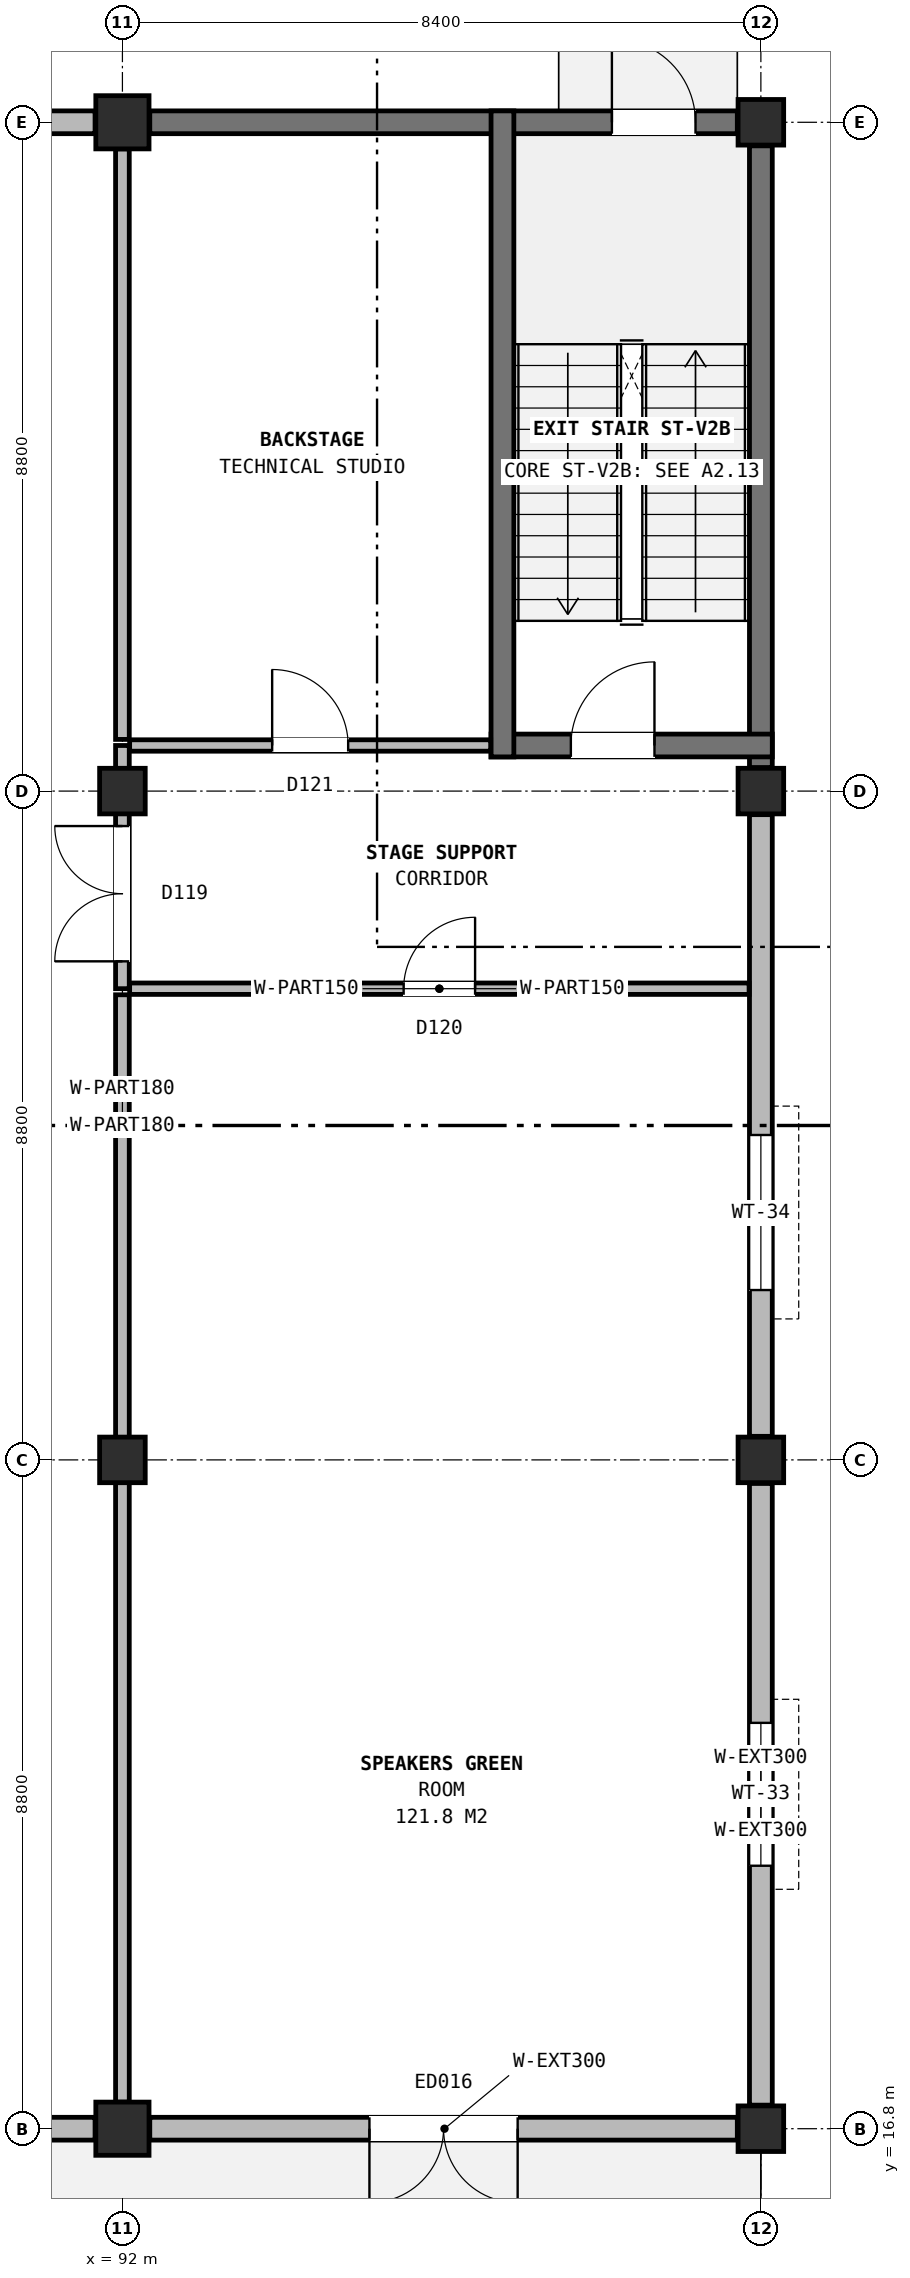
"""IFC4 building model, lengths in metres.
Left out: names, types, materials, properties, quantities, classifications, styles, units other than length and angle.
Written with IfcOpenShell. Run it as: python <this file> out.ifc"""

import sys

from ifc_helpers import new_model, si_unit, direction, frame, frame_2d, origin, origin_2d, place, context, subcontext, project, spatial, rectangle, extrude, element, fill, save


model = new_model("IFC4")
c1 = context("Model", 3, precision=1e-05, world=origin(), true_north=direction((0.0, 1.0)))
c2 = subcontext(c1, "Body", "Model", "MODEL_VIEW")
j1 = project(units=[si_unit("LENGTHUNIT", "METRE"), si_unit("PLANEANGLEUNIT", "RADIAN")], contexts=[c1])
p1 = place(None, origin())
s1 = spatial("IfcSite", under=j1, at=p1, CompositionType="ELEMENT")
p2 = place(p1, origin())
s2 = spatial("IfcBuilding", under=s1, at=p2, CompositionType="ELEMENT")
p3 = place(p2, origin())
s3 = spatial("IfcBuildingStorey", under=s2, at=p3, CompositionType="ELEMENT", Elevation=0.0)
p4 = place(p3, frame((92.0, 16.8, 0.0), z_axis=(0.0, 0.0, 1.0), x_axis=(1.0, 0.0, 0.0)))
e1 = element("IfcColumn", 1, at=p4, inside=s3, PredefinedType="COLUMN", context=c2, shape_type="SweptSolid", body=[
    extrude(rectangle(XDim=0.7, YDim=0.7, at=origin_2d()), origin(), (0.0, 0.0, 1.0), 4.8),
])
for number, where, z_axis, x_axis in (
    (2, (92.0, 25.6, 0.0), (0.0, 0.0, 1.0), (1.0, 0.0, 0.0)),
    (3, (92.0, 34.4, 0.0), (0.0, 0.0, 1.0), (1.0, 0.0, 0.0)),
):
    element("IfcColumn", number, at=place(p3, frame(where, z_axis=z_axis, x_axis=x_axis)), inside=s3, PredefinedType="COLUMN", context=c2, shape_type="SweptSolid", body=[
        extrude(rectangle(XDim=0.6, YDim=0.6, at=origin_2d()), origin(), (0.0, 0.0, 1.0), 4.8),
    ])
p5 = place(p3, frame((92.0, 43.2, 0.0), z_axis=(0.0, 0.0, 1.0), x_axis=(1.0, 0.0, 0.0)))
e4 = element("IfcColumn", 4, at=p5, inside=s3, PredefinedType="COLUMN", context=c2, shape_type="SweptSolid", body=[
    extrude(rectangle(XDim=0.7, YDim=0.7, at=origin_2d()), origin(), (0.0, 0.0, 1.0), 4.8),
])
for number, where, z_axis, x_axis in (
    (5, (100.4, 16.8, 0.0), (0.0, 0.0, 1.0), (1.0, 0.0, 0.0)),
    (6, (100.4, 25.6, 0.0), (0.0, 0.0, 1.0), (1.0, 0.0, 0.0)),
    (7, (100.4, 34.4, 0.0), (0.0, 0.0, 1.0), (1.0, 0.0, 0.0)),
    (8, (100.4, 43.2, 0.0), (0.0, 0.0, 1.0), (1.0, 0.0, 0.0)),
):
    element("IfcColumn", number, at=place(p3, frame(where, z_axis=z_axis, x_axis=x_axis)), inside=s3, PredefinedType="COLUMN", context=c2, shape_type="SweptSolid", body=[
        extrude(rectangle(XDim=0.6, YDim=0.6, at=origin_2d()), origin(), (0.0, 0.0, 1.0), 4.8),
    ])
p6 = place(p3, frame((83.96, 16.8, 0.0), z_axis=(0.0, 0.0, 1.0), x_axis=(1.0, 0.0, 0.0)))
e9 = element("IfcWall", 9, at=p6, inside=s3, PredefinedType="SOLIDWALL", context=c2, shape_type="SweptSolid", body=[
    extrude(rectangle(XDim=7.68, YDim=0.3, at=frame_2d((3.84, 0.0))), origin(), (0.0, 0.0, 1.0), 4.05),
])
p7 = place(p3, frame((92.36, 16.8, 0.0), z_axis=(0.0, 0.0, 1.0), x_axis=(1.0, 0.0, 0.0)))
e10 = element("IfcWall", 10, at=p7, inside=s3, PredefinedType="SOLIDWALL", context=c2, shape_type="SweptSolid", body=[
    extrude(rectangle(XDim=7.73, YDim=0.3, at=frame_2d((3.865, 0.0))), origin(), (0.0, 0.0, 1.0), 4.05),
])
p8 = place(p7, frame((2.89, 0.0, 0.0)))
e11 = element("IfcOpeningElement", 11, at=p8, cuts=e10, PredefinedType="OPENING", context=c2, shape_type="SweptSolid", body=[
    extrude(rectangle(XDim=1.95, YDim=2.45, at=frame_2d((0.975, 1.225))), frame((0.0, 0.16, 0.0), z_axis=(0.0, -1.0, 0.0), x_axis=(1.0, 0.0, 0.0)), (0.0, 0.0, 1.0), 0.32),
])
p9 = place(p3, frame((100.4, 17.11, 0.0), z_axis=(0.0, 0.0, 1.0), x_axis=(0.0, 1.0, 0.0)))
e12 = element("IfcWall", 12, at=p9, inside=s3, PredefinedType="SOLIDWALL", context=c2, shape_type="SweptSolid", body=[
    extrude(rectangle(XDim=8.18, YDim=0.3, at=frame_2d((4.09, 0.0))), origin(), (0.0, 0.0, 1.0), 4.05),
])
p10 = place(p9, frame((3.15, 0.0, 0.9)))
e13 = element("IfcOpeningElement", 13, at=p10, cuts=e12, PredefinedType="OPENING", context=c2, shape_type="SweptSolid", body=[
    extrude(rectangle(XDim=1.88, YDim=1.96, at=frame_2d((0.94, 0.98))), frame((0.0, 0.16, 0.0), z_axis=(0.0, -1.0, 0.0), x_axis=(1.0, 0.0, 0.0)), (0.0, 0.0, 1.0), 0.32),
])
p11 = place(p3, frame((100.4, 25.91, 0.0), z_axis=(0.0, 0.0, 1.0), x_axis=(0.0, 1.0, 0.0)))
e14 = element("IfcWall", 14, at=p11, inside=s3, PredefinedType="SOLIDWALL", context=c2, shape_type="SweptSolid", body=[
    extrude(rectangle(XDim=8.18, YDim=0.3, at=frame_2d((4.09, 0.0))), origin(), (0.0, 0.0, 1.0), 4.05),
])
p12 = place(p11, frame((1.925, 0.0, 0.9)))
e15 = element("IfcOpeningElement", 15, at=p12, cuts=e14, PredefinedType="OPENING", context=c2, shape_type="SweptSolid", body=[
    extrude(rectangle(XDim=2.04, YDim=1.98, at=frame_2d((1.02, 0.99))), frame((0.0, 0.16, 0.0), z_axis=(0.0, -1.0, 0.0), x_axis=(1.0, 0.0, 0.0)), (0.0, 0.0, 1.0), 0.32),
])
p13 = place(p3, frame((100.4, 34.71, 0.0), z_axis=(0.0, 0.0, 1.0), x_axis=(0.0, 1.0, 0.0)))
e16 = element("IfcWall", 16, at=p13, inside=s3, PredefinedType="SHEAR", context=c2, shape_type="SweptSolid", body=[
    extrude(rectangle(XDim=8.18, YDim=0.3, at=frame_2d((4.09, 0.0))), origin(), (0.0, 0.0, 1.0), 4.05),
])
p14 = place(p3, frame((100.09, 43.2, 0.0), z_axis=(0.0, 0.0, 1.0), x_axis=(-1.0, 0.0, 0.0)))
e17 = element("IfcWall", 17, at=p14, inside=s3, PredefinedType="SHEAR", context=c2, shape_type="SweptSolid", body=[
    extrude(rectangle(XDim=7.73, YDim=0.3, at=frame_2d((3.865, 0.0))), origin(), (0.0, 0.0, 1.0), 4.05),
])
p15 = place(p14, frame((0.55, 0.0, 0.0)))
e18 = element("IfcOpeningElement", 18, at=p15, cuts=e17, PredefinedType="OPENING", context=c2, shape_type="SweptSolid", body=[
    extrude(rectangle(XDim=1.1, YDim=2.2, at=frame_2d((0.55, 1.1))), frame((0.0, 0.16, 0.0), z_axis=(0.0, -1.0, 0.0), x_axis=(1.0, 0.0, 0.0)), (0.0, 0.0, 1.0), 0.32),
])
p16 = place(p3, frame((91.64, 43.2, 0.0), z_axis=(0.0, 0.0, 1.0), x_axis=(-1.0, 0.0, 0.0)))
e19 = element("IfcWall", 19, at=p16, inside=s3, PredefinedType="SOLIDWALL", context=c2, shape_type="SweptSolid", body=[
    extrude(rectangle(XDim=7.68, YDim=0.3, at=frame_2d((3.84, 0.0))), origin(), (0.0, 0.0, 1.0), 4.05),
])
p17 = place(p3, frame((96.85, 35.0, 0.0), z_axis=(0.0, 0.0, 1.0), x_axis=(1.0, 0.0, 0.0)))
e20 = element("IfcWall", 20, at=p17, inside=s3, PredefinedType="SHEAR", context=c2, shape_type="SweptSolid", body=[
    extrude(rectangle(XDim=3.7, YDim=0.3, at=frame_2d((1.85, 0.0))), origin(), (0.0, 0.0, 1.0), 4.8),
])
p18 = place(p17, frame((1.05, 0.0, 0.0)))
e21 = element("IfcOpeningElement", 21, at=p18, cuts=e20, PredefinedType="OPENING", context=c2, shape_type="SweptSolid", body=[
    extrude(rectangle(XDim=1.1, YDim=2.2, at=frame_2d((0.55, 1.1))), frame((0.0, 0.16, 0.0), z_axis=(0.0, -1.0, 0.0), x_axis=(1.0, 0.0, 0.0)), (0.0, 0.0, 1.0), 0.32),
])
p19 = place(p3, frame((97.0, 34.85, 0.0), z_axis=(0.0, 0.0, 1.0), x_axis=(0.0, 1.0, 0.0)))
e22 = element("IfcWall", 22, at=p19, inside=s3, PredefinedType="SHEAR", context=c2, shape_type="SweptSolid", body=[
    extrude(rectangle(XDim=8.5, YDim=0.3, at=frame_2d((4.25, 0.0))), origin(), (0.0, 0.0, 1.0), 4.8),
])
p20 = place(p3, frame((92.0, 31.8, 0.0), z_axis=(0.0, 0.0, 1.0), x_axis=(0.0, 1.0, 0.0)))
e23 = element("IfcWall", 23, at=p20, inside=s3, PredefinedType="PARTITIONING", context=c2, shape_type="SweptSolid", body=[
    extrude(rectangle(XDim=3.2, YDim=0.18, at=frame_2d((1.6, 0.0))), origin(), (0.0, 0.0, 1.0), 4.045),
])
p21 = place(p20, frame((0.36, 0.0, 0.0)))
e24 = element("IfcOpeningElement", 24, at=p21, cuts=e23, PredefinedType="OPENING", context=c2, shape_type="SweptSolid", body=[
    extrude(rectangle(XDim=1.78, YDim=2.3, at=frame_2d((0.89, 1.15))), frame((0.0, 0.1, 0.0), z_axis=(0.0, -1.0, 0.0), x_axis=(1.0, 0.0, 0.0)), (0.0, 0.0, 1.0), 0.2),
])
p22 = place(p3, frame((92.095, 31.8, 0.0), z_axis=(0.0, 0.0, 1.0), x_axis=(1.0, 0.0, 0.0)))
e25 = element("IfcWall", 25, at=p22, inside=s3, PredefinedType="PARTITIONING", context=c2, shape_type="SweptSolid", body=[
    extrude(rectangle(XDim=8.15, YDim=0.15, at=frame_2d((4.075, 0.0))), origin(), (0.0, 0.0, 1.0), 4.465),
])
p23 = place(p22, frame((3.605, 0.0, 0.0)))
e26 = element("IfcOpeningElement", 26, at=p23, cuts=e25, PredefinedType="OPENING", context=c2, shape_type="SweptSolid", body=[
    extrude(rectangle(XDim=0.94, YDim=2.12, at=frame_2d((0.47, 1.06))), frame((0.0, 0.085, 0.0), z_axis=(0.0, -1.0, 0.0), x_axis=(1.0, 0.0, 0.0)), (0.0, 0.0, 1.0), 0.17),
])
p24 = place(p3, frame((92.095, 35.0, 0.0), z_axis=(0.0, 0.0, 1.0), x_axis=(1.0, 0.0, 0.0)))
e27 = element("IfcWall", 27, at=p24, inside=s3, PredefinedType="PARTITIONING", context=c2, shape_type="SweptSolid", body=[
    extrude(rectangle(XDim=4.75, YDim=0.15, at=frame_2d((2.375, 0.0))), origin(), (0.0, 0.0, 1.0), 4.465),
])
p25 = place(p24, frame((1.875, 0.0, 0.0)))
e28 = element("IfcOpeningElement", 28, at=p25, cuts=e27, PredefinedType="OPENING", context=c2, shape_type="SweptSolid", body=[
    extrude(rectangle(XDim=1.0, YDim=2.16, at=frame_2d((0.5, 1.08))), frame((0.0, 0.085, 0.0), z_axis=(0.0, -1.0, 0.0), x_axis=(1.0, 0.0, 0.0)), (0.0, 0.0, 1.0), 0.17),
])
p26 = place(p3, frame((92.0, 17.15, 0.0), z_axis=(0.0, 0.0, 1.0), x_axis=(0.0, 1.0, 0.0)))
e29 = element("IfcWall", 29, at=p26, inside=s3, PredefinedType="PARTITIONING", context=c2, shape_type="SweptSolid", body=[
    extrude(rectangle(XDim=14.57, YDim=0.18, at=frame_2d((7.285, 0.0))), origin(), (0.0, 0.0, 1.0), 4.045),
])
p27 = place(p3, frame((92.0, 35.08, 0.0), z_axis=(0.0, 0.0, 1.0), x_axis=(0.0, 1.0, 0.0)))
e30 = element("IfcWall", 30, at=p27, inside=s3, PredefinedType="PARTITIONING", context=c2, shape_type="SweptSolid", body=[
    extrude(rectangle(XDim=7.77, YDim=0.18, at=frame_2d((3.885, 0.0))), origin(), (0.0, 0.0, 1.0), 4.045),
])
p28 = place(p8, frame((1.95, 0.0, 0.0), z_axis=(0.0, 0.0, 1.0), x_axis=(-1.0, 0.0, 0.0)))
e31 = element("IfcDoor", 31, at=p28, inside=s3, OperationType="DOUBLE_DOOR_SINGLE_SWING", PredefinedType="DOOR", context=c2, shape_type="SweptSolid", body=[
    extrude(rectangle(XDim=1.95, YDim=2.45, at=frame_2d((0.975, 1.225))), frame((0.0, 0.025, 0.0), z_axis=(0.0, -1.0, 0.0), x_axis=(1.0, 0.0, 0.0)), (0.0, 0.0, 1.0), 0.05),
])
fill(e11, e31)
p29 = place(p10, origin())
e32 = element("IfcWindow", 32, at=p29, inside=s3, PartitioningType="SINGLE_PANEL", PredefinedType="WINDOW", context=c2, shape_type="SweptSolid", body=[
    extrude(rectangle(XDim=1.88, YDim=1.96, at=frame_2d((0.94, 0.98))), frame((0.0, 0.03, 0.0), z_axis=(0.0, -1.0, 0.0), x_axis=(1.0, 0.0, 0.0)), (0.0, 0.0, 1.0), 0.06),
])
fill(e13, e32)
p30 = place(p12, origin())
e33 = element("IfcWindow", 33, at=p30, inside=s3, PartitioningType="SINGLE_PANEL", PredefinedType="WINDOW", context=c2, shape_type="SweptSolid", body=[
    extrude(rectangle(XDim=2.04, YDim=1.98, at=frame_2d((1.02, 0.99))), frame((0.0, 0.03, 0.0), z_axis=(0.0, -1.0, 0.0), x_axis=(1.0, 0.0, 0.0)), (0.0, 0.0, 1.0), 0.06),
])
fill(e15, e33)
p31 = place(p15, frame((1.1, 0.0, 0.0), z_axis=(0.0, 0.0, 1.0), x_axis=(-1.0, 0.0, 0.0)))
e34 = element("IfcDoor", 34, at=p31, inside=s3, OperationType="SINGLE_SWING_RIGHT", PredefinedType="DOOR", context=c2, shape_type="SweptSolid", body=[
    extrude(rectangle(XDim=1.1, YDim=2.2, at=frame_2d((0.55, 1.1))), frame((0.0, 0.025, 0.0), z_axis=(0.0, -1.0, 0.0), x_axis=(1.0, 0.0, 0.0)), (0.0, 0.0, 1.0), 0.05),
])
fill(e18, e34)
p32 = place(p18, origin())
e35 = element("IfcDoor", 35, at=p32, inside=s3, OperationType="SINGLE_SWING_RIGHT", PredefinedType="DOOR", context=c2, shape_type="SweptSolid", body=[
    extrude(rectangle(XDim=1.1, YDim=2.2, at=frame_2d((0.55, 1.1))), frame((0.0, 0.025, 0.0), z_axis=(0.0, -1.0, 0.0), x_axis=(1.0, 0.0, 0.0)), (0.0, 0.0, 1.0), 0.05),
])
fill(e21, e35)
p33 = place(p21, origin())
e36 = element("IfcDoor", 36, at=p33, inside=s3, OperationType="DOUBLE_DOOR_SINGLE_SWING", PredefinedType="DOOR", context=c2, shape_type="SweptSolid", body=[
    extrude(rectangle(XDim=1.78, YDim=2.3, at=frame_2d((0.89, 1.15))), frame((0.0, 0.025, 0.0), z_axis=(0.0, -1.0, 0.0), x_axis=(1.0, 0.0, 0.0)), (0.0, 0.0, 1.0), 0.05),
])
fill(e24, e36)
p34 = place(p23, origin())
e37 = element("IfcDoor", 37, at=p34, inside=s3, OperationType="SINGLE_SWING_RIGHT", PredefinedType="DOOR", context=c2, shape_type="SweptSolid", body=[
    extrude(rectangle(XDim=0.94, YDim=2.12, at=frame_2d((0.47, 1.06))), frame((0.0, 0.025, 0.0), z_axis=(0.0, -1.0, 0.0), x_axis=(1.0, 0.0, 0.0)), (0.0, 0.0, 1.0), 0.05),
])
fill(e26, e37)
p35 = place(p25, origin())
e38 = element("IfcDoor", 38, at=p35, inside=s3, OperationType="SINGLE_SWING_LEFT", PredefinedType="DOOR", context=c2, shape_type="SweptSolid", body=[
    extrude(rectangle(XDim=1.0, YDim=2.16, at=frame_2d((0.5, 1.08))), frame((0.0, 0.025, 0.0), z_axis=(0.0, -1.0, 0.0), x_axis=(1.0, 0.0, 0.0)), (0.0, 0.0, 1.0), 0.05),
])
fill(e28, e38)
save(model, sys.argv[1])
